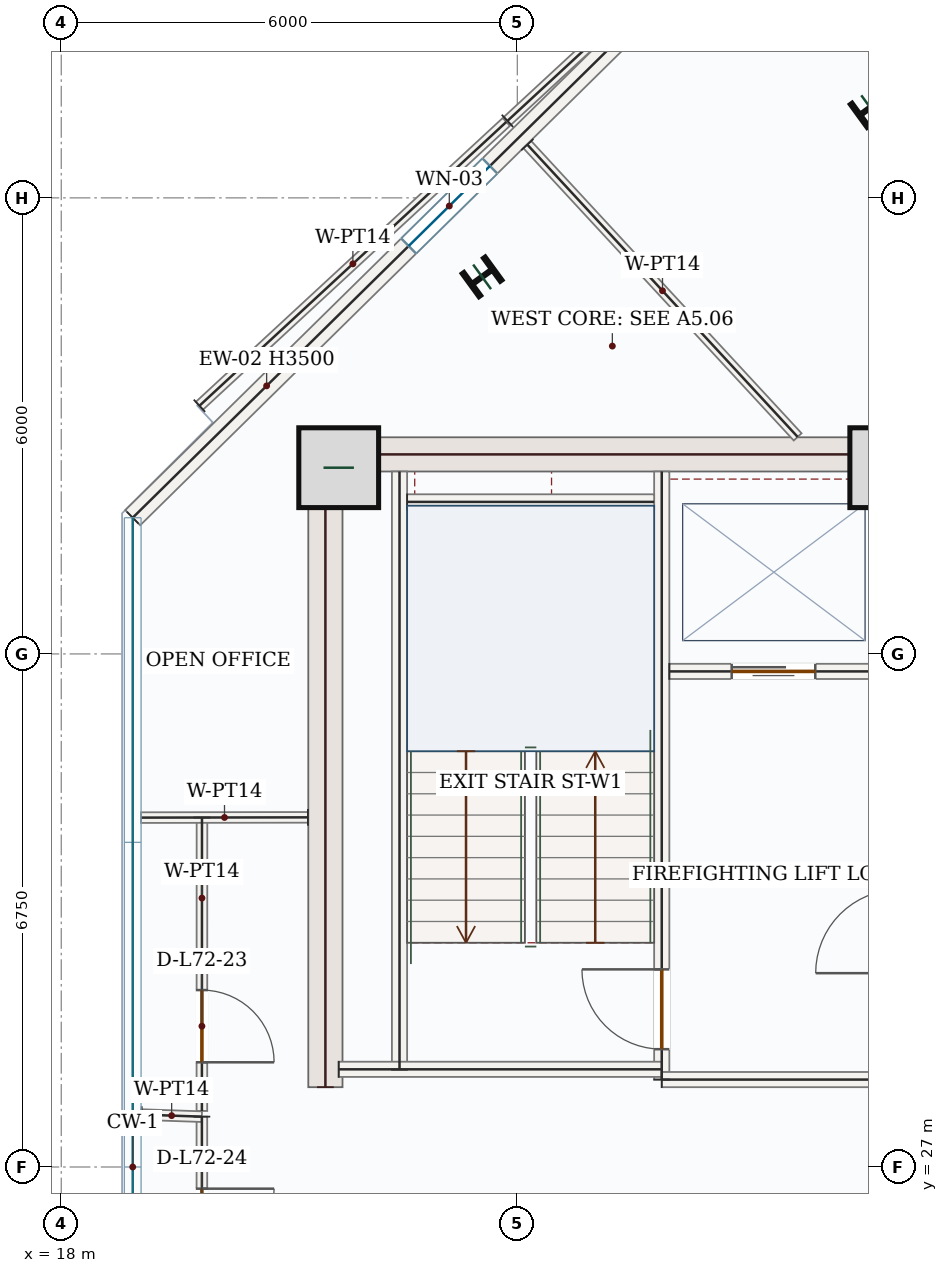
"""IFC4 building model, lengths in metres.
Left out: names, types, materials, properties, quantities, classifications, styles, units other than length and angle.
Written with IfcOpenShell. Run it as: python <this file> out.ifc"""

import sys

from ifc_helpers import new_model, si_unit, direction, frame, frame_2d, origin, origin_2d, place, context, subcontext, project, spatial, rectangle, i_section, extrude, source, transform, mapped, element, fill, save


model = new_model("IFC4")
c1 = context("Model", 3, precision=1e-05, world=origin(), true_north=direction((0.0, 1.0)))
c2 = subcontext(c1, "Body", "Model", "MODEL_VIEW")
j1 = project(units=[si_unit("LENGTHUNIT", "METRE"), si_unit("PLANEANGLEUNIT", "RADIAN")], contexts=[c1])
p1 = place(None, origin())
s1 = spatial("IfcSite", under=j1, at=p1, CompositionType="ELEMENT")
p2 = place(p1, origin())
s2 = spatial("IfcBuilding", under=s1, at=p2, CompositionType="ELEMENT")
p3 = place(p2, frame((0.0, 0.0, 299.1)))
s3 = spatial("IfcBuildingStorey", under=s2, at=p3, CompositionType="ELEMENT", Elevation=299.1)
m1 = source(origin(), c2, "Body", "SweptSolid", [
    extrude(rectangle(XDim=8.55, YDim=0.45, at=frame_2d((4.275, 0.0))), origin(), (0.0, 0.0, 1.0), 3.5),
])
p4 = place(p3, frame((21.475, 28.05, 0.0), z_axis=(0.0, 0.0, 1.0), x_axis=(0.0, 1.0, 0.0)))
e1 = element("IfcWall", 1, at=p4, inside=s3, PredefinedType="SHEAR", context=c2, shape_type="MappedRepresentation", body=[
    mapped(m1, transform((0.0, 0.0, 0.0), x_axis=(1.0, 0.0, 0.0), y_axis=(0.0, 1.0, 0.0), z_axis=(0.0, 0.0, 1.0), scale=1.0)),
])
m2 = source(origin(), c2, "Body", "SweptSolid", [
    extrude(rectangle(XDim=7.1, YDim=0.45, at=frame_2d((3.55, 0.0))), origin(), (0.0, 0.0, 1.0), 3.5),
])
p5 = place(p3, frame((21.7, 36.375, 0.0), z_axis=(0.0, 0.0, 1.0), x_axis=(1.0, 0.0, 0.0)))
e2 = element("IfcWall", 2, at=p5, inside=s3, PredefinedType="SHEAR", context=c2, shape_type="MappedRepresentation", body=[
    mapped(m2, transform((0.0, 0.0, 0.0), x_axis=(1.0, 0.0, 0.0), y_axis=(0.0, 1.0, 0.0), z_axis=(0.0, 0.0, 1.0), scale=1.0)),
])
m3 = source(origin(), c2, "Body", "SweptSolid", [
    extrude(rectangle(XDim=1.05, YDim=1.05, at=origin_2d()), origin(), (0.0, 0.0, 1.0), 3.75),
])
for number, where, z_axis, x_axis in (
    (3, (21.65, 36.2, 0.0), (0.0, 0.0, 1.0), (1.0, 0.0, 0.0)),
    (4, (28.9, 36.2, 0.0), (0.0, 0.0, 1.0), (1.0, 0.0, 0.0)),
):
    element("IfcColumn", number, at=place(p3, frame(where, z_axis=z_axis, x_axis=x_axis)), inside=s3, PredefinedType="COLUMN", context=c2, shape_type="MappedRepresentation", body=[
        mapped(m3, transform((0.0, 0.0, 0.0), x_axis=(1.0, 0.0, 0.0), y_axis=(0.0, 1.0, 0.0), z_axis=(0.0, 0.0, 1.0), scale=1.0)),
    ])
m4 = source(origin(), c2, "Body", "SweptSolid", [
    extrude(i_section(OverallWidth=0.374, OverallDepth=0.372, WebThickness=0.016, FlangeThickness=0.026, FilletRadius=0.018, at=origin_2d()), origin(), (0.0, 0.0, 1.0), 3.75),
])
for number, where, z_axis, x_axis in (
    (5, (28.643, 40.937, 0.0), (0.0, 0.0, 1.0), (-0.588, 0.809, 0.0)),
    (6, (23.536, 38.711, 0.0), (0.0, 0.0, 1.0), (-0.588, 0.809, 0.0)),
):
    element("IfcColumn", number, at=place(p3, frame(where, z_axis=z_axis, x_axis=x_axis)), inside=s3, PredefinedType="COLUMN", context=c2, shape_type="MappedRepresentation", body=[
        mapped(m4, transform((0.0, 0.0, 0.0), x_axis=(1.0, 0.0, 0.0), y_axis=(0.0, 1.0, 0.0), z_axis=(0.0, 0.0, 1.0), scale=1.0)),
    ])
p6 = place(p3, frame((18.94, 35.542, 0.0), z_axis=(0.0, 0.0, 1.0), x_axis=(0.712557502542, 0.701613715353, 0.0)))
e7 = element("IfcWall", 7, at=p6, inside=s3, PredefinedType="SOLIDWALL", context=c2, shape_type="SweptSolid", body=[
    extrude(rectangle(XDim=11.69, YDim=0.28, at=frame_2d((5.845, 0.0))), origin(), (0.0, 0.0, 1.0), 3.5),
])
p7 = place(p6, frame((5.095, 0.0, 0.85)))
e8 = element("IfcOpeningElement", 8, at=p7, cuts=e7, PredefinedType="OPENING", context=c2, shape_type="SweptSolid", body=[
    extrude(rectangle(XDim=1.5, YDim=1.5, at=frame_2d((0.75, 0.75))), frame((0.0, 0.15, 0.0), z_axis=(0.0, -1.0, 0.0), x_axis=(1.0, 0.0, 0.0)), (0.0, 0.0, 1.0), 0.3),
])
m5 = source(origin(), c2, "Body", "SweptSolid", [
    extrude(rectangle(XDim=7.87, YDim=0.2, at=frame_2d((3.935, 0.0))), origin(), (0.0, 0.0, 1.0), 3.5),
])
p8 = place(p3, frame((22.45, 28.28, 0.0), z_axis=(0.0, 0.0, 1.0), x_axis=(0.0, 1.0, 0.0)))
e9 = element("IfcWall", 9, at=p8, inside=s3, PredefinedType="SOLIDWALL", context=c2, shape_type="MappedRepresentation", body=[
    mapped(m5, transform((0.0, 0.0, 0.0), x_axis=(1.0, 0.0, 0.0), y_axis=(0.0, 1.0, 0.0), z_axis=(0.0, 0.0, 1.0), scale=1.0)),
])
p9 = place(p3, frame((25.9, 28.15, 0.0), z_axis=(0.0, 0.0, 1.0), x_axis=(0.0, 1.0, 0.0)))
e10 = element("IfcWall", 10, at=p9, inside=s3, PredefinedType="SOLIDWALL", context=c2, shape_type="SweptSolid", body=[
    extrude(rectangle(XDim=8.0, YDim=0.2, at=frame_2d((4.0, 0.0))), origin(), (0.0, 0.0, 1.0), 3.5),
])
p10 = place(p9, frame((0.4, 0.0, 0.0)))
e11 = element("IfcOpeningElement", 11, at=p10, cuts=e10, PredefinedType="OPENING", context=c2, shape_type="SweptSolid", body=[
    extrude(rectangle(XDim=1.05, YDim=2.15, at=frame_2d((0.525, 1.075))), frame((0.0, 0.11, 0.0), z_axis=(0.0, -1.0, 0.0), x_axis=(1.0, 0.0, 0.0)), (0.0, 0.0, 1.0), 0.22),
])
m6 = source(origin(), c2, "Body", "SweptSolid", [
    extrude(rectangle(XDim=4.25, YDim=0.2, at=frame_2d((2.125, 0.0))), origin(), (0.0, 0.0, 1.0), 3.5),
])
p11 = place(p3, frame((21.65, 28.285, 0.0), z_axis=(0.0, 0.0, 1.0), x_axis=(1.0, 0.0, 0.0)))
e12 = element("IfcWall", 12, at=p11, inside=s3, PredefinedType="SOLIDWALL", context=c2, shape_type="MappedRepresentation", body=[
    mapped(m6, transform((0.0, 0.0, 0.0), x_axis=(1.0, 0.0, 0.0), y_axis=(0.0, 1.0, 0.0), z_axis=(0.0, 0.0, 1.0), scale=1.0)),
])
m7 = source(origin(), c2, "Body", "SweptSolid", [
    extrude(rectangle(XDim=3.0, YDim=0.2, at=frame_2d((1.5, 0.0))), origin(), (0.0, 0.0, 1.0), 3.5),
])
p12 = place(p3, frame((25.9, 28.15, 0.0), z_axis=(0.0, 0.0, 1.0), x_axis=(1.0, 0.0, 0.0)))
e13 = element("IfcWall", 13, at=p12, inside=s3, PredefinedType="SOLIDWALL", context=c2, shape_type="MappedRepresentation", body=[
    mapped(m7, transform((0.0, 0.0, 0.0), x_axis=(1.0, 0.0, 0.0), y_axis=(0.0, 1.0, 0.0), z_axis=(0.0, 0.0, 1.0), scale=1.0)),
])
m8 = source(origin(), c2, "Body", "SweptSolid", [
    extrude(rectangle(XDim=3.25, YDim=0.2, at=frame_2d((1.625, 0.0))), origin(), (0.0, 0.0, 1.0), 3.5),
])
p13 = place(p3, frame((22.55, 35.75, 0.0), z_axis=(0.0, 0.0, 1.0), x_axis=(1.0, 0.0, 0.0)))
e14 = element("IfcWall", 14, at=p13, inside=s3, PredefinedType="SOLIDWALL", context=c2, shape_type="MappedRepresentation", body=[
    mapped(m8, transform((0.0, 0.0, 0.0), x_axis=(1.0, 0.0, 0.0), y_axis=(0.0, 1.0, 0.0), z_axis=(0.0, 0.0, 1.0), scale=1.0)),
])
p14 = place(p3, frame((26.0, 33.52, 0.0), z_axis=(0.0, 0.0, 1.0), x_axis=(1.0, 0.0, 0.0)))
e15 = element("IfcWall", 15, at=p14, inside=s3, PredefinedType="SOLIDWALL", context=c2, shape_type="SweptSolid", body=[
    extrude(rectangle(XDim=2.75, YDim=0.2, at=frame_2d((1.375, 0.0))), origin(), (0.0, 0.0, 1.0), 3.5),
])
p15 = place(p14, frame((0.82, 0.0, 0.0)))
e16 = element("IfcOpeningElement", 16, at=p15, cuts=e15, PredefinedType="OPENING", context=c2, shape_type="SweptSolid", body=[
    extrude(rectangle(XDim=1.1, YDim=2.15, at=frame_2d((0.55, 1.075))), frame((0.0, 0.11, 0.0), z_axis=(0.0, -1.0, 0.0), x_axis=(1.0, 0.0, 0.0)), (0.0, 0.0, 1.0), 0.22),
])
p16 = place(p3, frame((19.85, 27.662, 0.0), z_axis=(0.0, 0.0, 1.0), x_axis=(0.0, -1.0, 0.0)))
e17 = element("IfcWall", 17, at=p16, inside=s3, PredefinedType="PARTITIONING", context=c2, shape_type="SweptSolid", body=[
    extrude(rectangle(XDim=5.256, YDim=0.14, at=frame_2d((2.628, 0.0))), origin(), (0.0, 0.0, 1.0), 3.5),
])
p17 = place(p16, frame((0.948, 0.0, 0.0)))
e18 = element("IfcOpeningElement", 18, at=p17, cuts=e17, PredefinedType="OPENING", context=c2, shape_type="SweptSolid", body=[
    extrude(rectangle(XDim=0.95, YDim=2.15, at=frame_2d((0.475, 1.075))), frame((0.0, 0.08, 0.0), z_axis=(0.0, -1.0, 0.0), x_axis=(1.0, 0.0, 0.0)), (0.0, 0.0, 1.0), 0.16),
])
m9 = source(origin(), c2, "Body", "SweptSolid", [
    extrude(rectangle(XDim=0.795, YDim=0.14, at=frame_2d((0.397, 0.0))), origin(), (0.0, 0.0, 1.0), 3.5),
])
p18 = place(p3, frame((19.055, 27.689, 0.0), z_axis=(0.0, 0.0, 1.0), x_axis=(0.999418697686, -0.034092033019, 0.0)))
e19 = element("IfcWall", 19, at=p18, inside=s3, PredefinedType="PARTITIONING", context=c2, shape_type="MappedRepresentation", body=[
    mapped(m9, transform((0.0, 0.0, 0.0), x_axis=(1.0, 0.0, 0.0), y_axis=(0.0, 1.0, 0.0), z_axis=(0.0, 0.0, 1.0), scale=1.0)),
])
p19 = place(p3, frame((19.851, 31.598, 0.0), z_axis=(0.0, 0.0, 1.0), x_axis=(-0.000316215517, -0.999999950004, 0.0)))
e20 = element("IfcWall", 20, at=p19, inside=s3, PredefinedType="PARTITIONING", context=c2, shape_type="SweptSolid", body=[
    extrude(rectangle(XDim=3.86, YDim=0.14, at=frame_2d((1.93, 0.0))), origin(), (0.0, 0.0, 1.0), 3.5),
])
p20 = place(p19, frame((2.27, 0.0, 0.0)))
e21 = element("IfcOpeningElement", 21, at=p20, cuts=e20, PredefinedType="OPENING", context=c2, shape_type="SweptSolid", body=[
    extrude(rectangle(XDim=0.95, YDim=2.15, at=frame_2d((0.475, 1.075))), frame((0.0, 0.08, 0.0), z_axis=(0.0, -1.0, 0.0), x_axis=(1.0, 0.0, 0.0)), (0.0, 0.0, 1.0), 0.16),
])
m10 = source(origin(), c2, "Body", "SweptSolid", [
    extrude(rectangle(XDim=5.5, YDim=0.14, at=frame_2d((2.75, 0.0))), origin(), (0.0, 0.0, 1.0), 3.5),
])
p21 = place(p3, frame((19.818, 37.015, 0.0), z_axis=(0.0, 0.0, 1.0), x_axis=(0.734137611872, 0.679000711954, 0.0)))
e22 = element("IfcWall", 22, at=p21, inside=s3, PredefinedType="PARTITIONING", context=c2, shape_type="MappedRepresentation", body=[
    mapped(m10, transform((0.0, 0.0, 0.0), x_axis=(1.0, 0.0, 0.0), y_axis=(0.0, 1.0, 0.0), z_axis=(0.0, 0.0, 1.0), scale=1.0)),
])
m11 = source(origin(), c2, "Body", "SweptSolid", [
    extrude(rectangle(XDim=5.238, YDim=0.14, at=frame_2d((2.619, 0.0))), origin(), (0.0, 0.0, 1.0), 3.5),
])
p22 = place(p3, frame((24.132, 40.45, 0.0), z_axis=(0.0, 0.0, 1.0), x_axis=(0.67899802156, -0.734140100197, 0.0)))
e23 = element("IfcWall", 23, at=p22, inside=s3, PredefinedType="PARTITIONING", context=c2, shape_type="MappedRepresentation", body=[
    mapped(m11, transform((0.0, 0.0, 0.0), x_axis=(1.0, 0.0, 0.0), y_axis=(0.0, 1.0, 0.0), z_axis=(0.0, 0.0, 1.0), scale=1.0)),
])
m12 = source(origin(), c2, "Body", "SweptSolid", [
    extrude(rectangle(XDim=2.195, YDim=0.14, at=frame_2d((1.098, 0.0))), origin(), (0.0, 0.0, 1.0), 3.5),
])
p23 = place(p3, frame((21.245, 31.6, 0.0), z_axis=(0.0, 0.0, 1.0), x_axis=(-0.999998787702, -0.001557110781, 0.0)))
e24 = element("IfcWall", 24, at=p23, inside=s3, PredefinedType="PARTITIONING", context=c2, shape_type="MappedRepresentation", body=[
    mapped(m12, transform((0.0, 0.0, 0.0), x_axis=(1.0, 0.0, 0.0), y_axis=(0.0, 1.0, 0.0), z_axis=(0.0, 0.0, 1.0), scale=1.0)),
])
m13 = source(origin(), c2, "Body", "SweptSolid", [
    extrude(rectangle(XDim=3.722, YDim=0.14, at=frame_2d((1.861, 0.0))), origin(), (0.0, 0.0, 1.0), 3.5),
])
p24 = place(p3, frame((23.87, 40.763, 0.0), z_axis=(0.0, 0.0, 1.0), x_axis=(0.734119057589, 0.679020772352, 0.0)))
e25 = element("IfcWall", 25, at=p24, inside=s3, PredefinedType="PARTITIONING", context=c2, shape_type="MappedRepresentation", body=[
    mapped(m13, transform((0.0, 0.0, 0.0), x_axis=(1.0, 0.0, 0.0), y_axis=(0.0, 1.0, 0.0), z_axis=(0.0, 0.0, 1.0), scale=1.0)),
])
m14 = source(origin(), c2, "Body", "SweptSolid", [
    extrude(rectangle(XDim=1.5, YDim=1.5, at=frame_2d((0.75, 0.75))), frame((0.0, 0.03, 0.0), z_axis=(0.0, -1.0, 0.0), x_axis=(1.0, 0.0, 0.0)), (0.0, 0.0, 1.0), 0.06),
])
p25 = place(p7, origin())
e26 = element("IfcWindow", 26, at=p25, inside=s3, PartitioningType="SINGLE_PANEL", PredefinedType="WINDOW", context=c2, shape_type="MappedRepresentation", body=[
    mapped(m14, transform((0.0, 0.0, 0.0), x_axis=(1.0, 0.0, 0.0), y_axis=(0.0, 1.0, 0.0), z_axis=(0.0, 0.0, 1.0), scale=1.0)),
])
fill(e8, e26)
m15 = source(origin(), c2, "Body", "SweptSolid", [
    extrude(rectangle(XDim=1.05, YDim=2.15, at=frame_2d((0.525, 1.075))), frame((0.0, 0.025, 0.0), z_axis=(0.0, -1.0, 0.0), x_axis=(1.0, 0.0, 0.0)), (0.0, 0.0, 1.0), 0.05),
])
p26 = place(p10, origin())
e27 = element("IfcDoor", 27, at=p26, inside=s3, OperationType="SINGLE_SWING_RIGHT", PredefinedType="DOOR", context=c2, shape_type="MappedRepresentation", body=[
    mapped(m15, transform((0.0, 0.0, 0.0), x_axis=(1.0, 0.0, 0.0), y_axis=(0.0, 1.0, 0.0), z_axis=(0.0, 0.0, 1.0), scale=1.0)),
])
fill(e11, e27)
m16 = source(origin(), c2, "Body", "SweptSolid", [
    extrude(rectangle(XDim=1.1, YDim=2.15, at=frame_2d((0.55, 1.075))), frame((0.0, 0.025, 0.0), z_axis=(0.0, -1.0, 0.0), x_axis=(1.0, 0.0, 0.0)), (0.0, 0.0, 1.0), 0.05),
])
p27 = place(p15, origin())
e28 = element("IfcDoor", 28, at=p27, inside=s3, OperationType="DOUBLE_DOOR_SLIDING", PredefinedType="DOOR", context=c2, shape_type="MappedRepresentation", body=[
    mapped(m16, transform((0.0, 0.0, 0.0), x_axis=(1.0, 0.0, 0.0), y_axis=(0.0, 1.0, 0.0), z_axis=(0.0, 0.0, 1.0), scale=1.0)),
])
fill(e16, e28)
m17 = source(origin(), c2, "Body", "SweptSolid", [
    extrude(rectangle(XDim=0.95, YDim=2.15, at=frame_2d((0.475, 1.075))), frame((0.0, 0.025, 0.0), z_axis=(0.0, -1.0, 0.0), x_axis=(1.0, 0.0, 0.0)), (0.0, 0.0, 1.0), 0.05),
])
p28 = place(p20, origin())
e29 = element("IfcDoor", 29, at=p28, inside=s3, OperationType="SINGLE_SWING_RIGHT", PredefinedType="DOOR", context=c2, shape_type="MappedRepresentation", body=[
    mapped(m17, transform((0.0, 0.0, 0.0), x_axis=(1.0, 0.0, 0.0), y_axis=(0.0, 1.0, 0.0), z_axis=(0.0, 0.0, 1.0), scale=1.0)),
])
fill(e21, e29)
p29 = place(p17, origin())
e30 = element("IfcDoor", 30, at=p29, inside=s3, OperationType="SINGLE_SWING_LEFT", PredefinedType="DOOR", context=c2, shape_type="MappedRepresentation", body=[
    mapped(m17, transform((0.0, 0.0, 0.0), x_axis=(1.0, 0.0, 0.0), y_axis=(0.0, 1.0, 0.0), z_axis=(0.0, 0.0, 1.0), scale=1.0)),
])
fill(e18, e30)
save(model, sys.argv[1])
